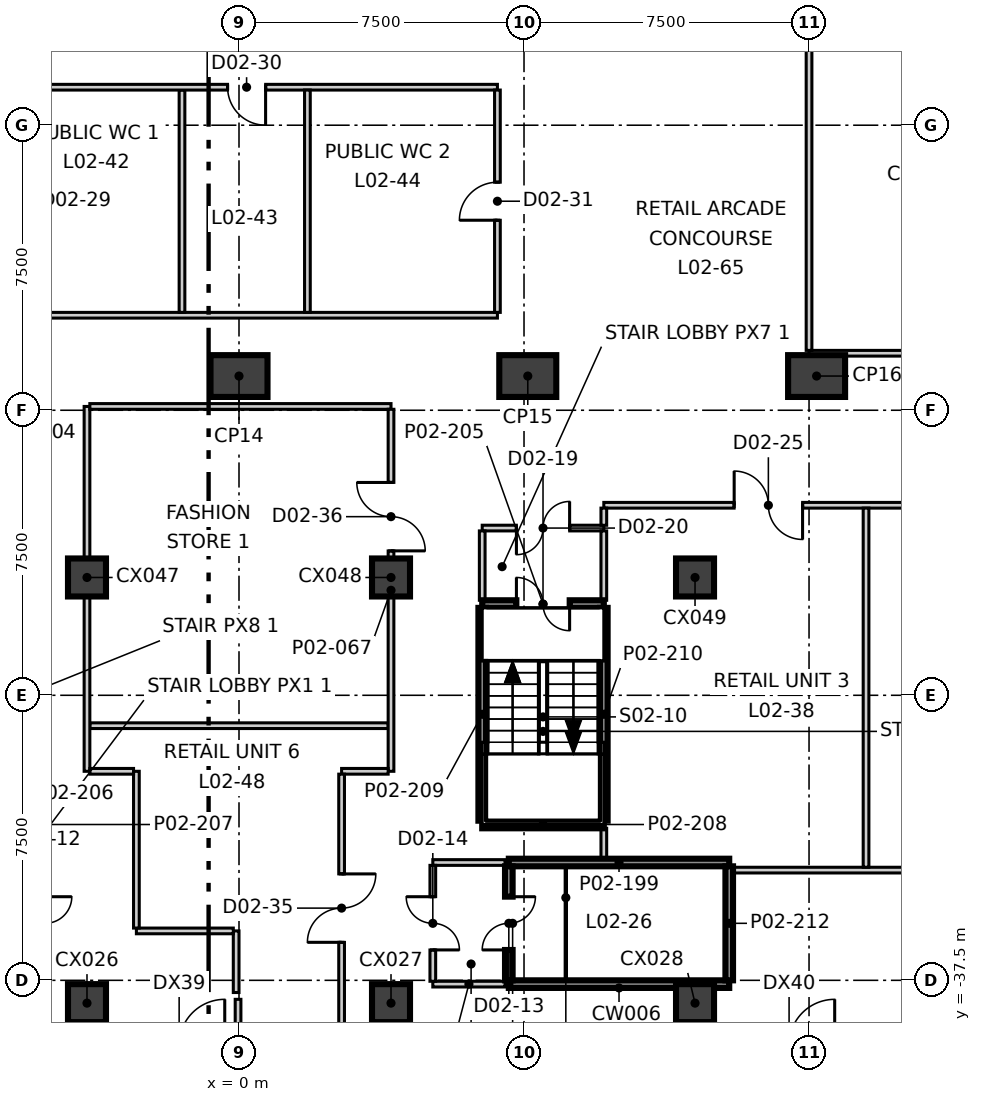
"""IFC4 building model, lengths in metres.
Left out: names, types, materials, properties, quantities, classifications, styles, units other than length and angle.
Written with IfcOpenShell. Run it as: python <this file> out.ifc"""

import sys

from ifc_helpers import new_model, si_unit, direction, frame, frame_2d, origin, origin_2d, place, context, subcontext, project, spatial, rectangle, extrude, element, fill, save


model = new_model("IFC4")
c1 = context("Model", 3, precision=1e-05, world=origin(), true_north=direction((0.0, 1.0)))
c2 = subcontext(c1, "Body", "Model", "MODEL_VIEW")
j1 = project(units=[si_unit("LENGTHUNIT", "METRE"), si_unit("PLANEANGLEUNIT", "RADIAN")], contexts=[c1])
p1 = place(None, origin())
s1 = spatial("IfcSite", under=j1, at=p1, CompositionType="ELEMENT")
p2 = place(p1, origin())
s2 = spatial("IfcBuilding", under=s1, at=p2, CompositionType="ELEMENT")
p3 = place(p2, frame((0.0, 0.0, 14.5)))
s3 = spatial("IfcBuildingStorey", under=s2, at=p3, CompositionType="ELEMENT", Elevation=14.5)
for number, where, z_axis, x_axis in (
    (1, (0.0, -21.6, -0.4), (0.0, 0.0, 1.0), (1.0, 0.0, 0.0)),
    (2, (7.599, -21.6, -0.4), (0.0, 0.0, 1.0), (1.0, 0.0, 0.0)),
    (3, (15.199, -21.6, -0.4), (0.0, 0.0, 1.0), (1.0, 0.0, 0.0)),
):
    element("IfcColumn", number, at=place(p3, frame(where, z_axis=z_axis, x_axis=x_axis)), inside=s3, PredefinedType="COLUMN", context=c2, shape_type="SweptSolid", body=[
        extrude(rectangle(XDim=1.5, YDim=1.1, at=origin_2d()), origin(), (0.0, 0.0, 1.0), 5.4),
    ])
for number, where, z_axis, x_axis in (
    (4, (-4.0, -38.1, -0.4), (0.0, 0.0, 1.0), (1.0, 0.0, 0.0)),
    (5, (4.0, -38.1, -0.4), (0.0, 0.0, 1.0), (1.0, 0.0, 0.0)),
    (6, (12.0, -38.1, -0.4), (0.0, 0.0, 1.0), (1.0, 0.0, 0.0)),
    (7, (-4.0, -26.9, -0.4), (0.0, 0.0, 1.0), (1.0, 0.0, 0.0)),
    (8, (4.0, -26.9, -0.4), (0.0, 0.0, 1.0), (1.0, 0.0, 0.0)),
    (9, (12.0, -26.9, -0.4), (0.0, 0.0, 1.0), (1.0, 0.0, 0.0)),
):
    element("IfcColumn", number, at=place(p3, frame(where, z_axis=z_axis, x_axis=x_axis)), inside=s3, PredefinedType="COLUMN", context=c2, shape_type="SweptSolid", body=[
        extrude(rectangle(XDim=1.0, YDim=1.0, at=origin_2d()), origin(), (0.0, 0.0, 1.0), 5.4),
    ])
p4 = place(p3, frame((6.4, -25.6, 0.0), z_axis=(0.0, 0.0, 1.0), x_axis=(1.0, 0.0, 0.0)))
e10 = element("IfcWall", 10, at=p4, inside=s3, PredefinedType="PARTITIONING", context=c2, shape_type="SweptSolid", body=[
    extrude(rectangle(XDim=3.2, YDim=0.15, at=frame_2d((1.6, 0.0))), origin(), (0.0, 0.0, 1.0), 5.0),
])
p5 = place(p4, frame((0.9, 0.0, 0.0)))
e11 = element("IfcOpeningElement", 11, at=p5, cuts=e10, PredefinedType="OPENING", context=c2, shape_type="SweptSolid", body=[
    extrude(rectangle(XDim=1.4, YDim=2.1, at=frame_2d((0.7, 1.05))), frame((0.0, 0.085, 0.0), z_axis=(0.0, -1.0, 0.0), x_axis=(1.0, 0.0, 0.0)), (0.0, 0.0, 1.0), 0.17),
])
for number, where, z_axis, x_axis in (
    (12, (5.1, -34.4, 0.0), (0.0, 0.0, 1.0), (1.0, 0.0, 0.0)),
    (13, (5.1, -37.6, 0.0), (0.0, 0.0, 1.0), (1.0, 0.0, 0.0)),
):
    element("IfcWall", number, at=place(p3, frame(where, z_axis=z_axis, x_axis=x_axis)), inside=s3, PredefinedType="PARTITIONING", context=c2, shape_type="SweptSolid", body=[
        extrude(rectangle(XDim=1.9, YDim=0.15, at=frame_2d((0.95, 0.0))), origin(), (0.0, 0.0, 1.0), 5.0),
    ])
for number, where, z_axis, x_axis in (
    (14, (6.4, -27.5, 0.0), (0.0, 0.0, 1.0), (0.0, 1.0, 0.0)),
    (15, (9.6, -27.5, 0.0), (0.0, 0.0, 1.0), (0.0, 1.0, 0.0)),
):
    element("IfcWall", number, at=place(p3, frame(where, z_axis=z_axis, x_axis=x_axis)), inside=s3, PredefinedType="PARTITIONING", context=c2, shape_type="SweptSolid", body=[
        extrude(rectangle(XDim=1.825, YDim=0.15, at=frame_2d((0.913, 0.0))), origin(), (0.0, 0.0, 1.0), 5.0),
    ])
p6 = place(p3, frame((5.1, -37.525, 0.0), z_axis=(0.0, 0.0, 1.0), x_axis=(0.0, 1.0, 0.0)))
e16 = element("IfcWall", 16, at=p6, inside=s3, PredefinedType="PARTITIONING", context=c2, shape_type="SweptSolid", body=[
    extrude(rectangle(XDim=3.05, YDim=0.15, at=frame_2d((1.525, 0.0))), origin(), (0.0, 0.0, 1.0), 5.0),
])
p7 = place(p6, frame((0.825, 0.0, 0.0)))
e17 = element("IfcOpeningElement", 17, at=p7, cuts=e16, PredefinedType="OPENING", context=c2, shape_type="SweptSolid", body=[
    extrude(rectangle(XDim=1.4, YDim=2.1, at=frame_2d((0.7, 1.05))), frame((0.0, 0.085, 0.0), z_axis=(0.0, -1.0, 0.0), x_axis=(1.0, 0.0, 0.0)), (0.0, 0.0, 1.0), 0.17),
])
p8 = place(p3, frame((13.0, -34.6, 0.0), z_axis=(0.0, 0.0, 1.0), x_axis=(1.0, 0.0, 0.0)))
e18 = element("IfcWall", 18, at=p8, inside=s3, PredefinedType="PARTITIONING", context=c2, shape_type="SweptSolid", body=[
    extrude(rectangle(XDim=14.3, YDim=0.15, at=frame_2d((7.15, 0.0))), origin(), (0.0, 0.0, 1.0), 5.0),
])
p9 = place(p3, frame((9.6, -25.0, 0.0), z_axis=(0.0, 0.0, 1.0), x_axis=(1.0, 0.0, 0.0)))
e19 = element("IfcWall", 19, at=p9, inside=s3, PredefinedType="PARTITIONING", context=c2, shape_type="SweptSolid", body=[
    extrude(rectangle(XDim=17.7, YDim=0.15, at=frame_2d((8.85, 0.0))), origin(), (0.0, 0.0, 1.0), 5.0),
])
p10 = place(p9, frame((3.43, 0.0, 0.0)))
e20 = element("IfcOpeningElement", 20, at=p10, cuts=e19, PredefinedType="OPENING", context=c2, shape_type="SweptSolid", body=[
    extrude(rectangle(XDim=1.8, YDim=2.1, at=frame_2d((0.9, 1.05))), frame((0.0, 0.085, 0.0), z_axis=(0.0, -1.0, 0.0), x_axis=(1.0, 0.0, 0.0)), (0.0, 0.0, 1.0), 0.17),
])
p11 = place(p9, frame((9.74, 0.0, 0.0)))
e21 = element("IfcOpeningElement", 21, at=p11, cuts=e19, PredefinedType="OPENING", context=c2, shape_type="SweptSolid", body=[
    extrude(rectangle(XDim=1.8, YDim=2.1, at=frame_2d((0.9, 1.05))), frame((0.0, 0.085, 0.0), z_axis=(0.0, -1.0, 0.0), x_axis=(1.0, 0.0, 0.0)), (0.0, 0.0, 1.0), 0.17),
])
p12 = place(p3, frame((-3.925, -30.8, 0.0), z_axis=(0.0, 0.0, 1.0), x_axis=(1.0, 0.0, 0.0)))
e22 = element("IfcWall", 22, at=p12, inside=s3, PredefinedType="PARTITIONING", context=c2, shape_type="SweptSolid", body=[
    extrude(rectangle(XDim=7.85, YDim=0.15, at=frame_2d((3.925, 0.0))), origin(), (0.0, 0.0, 1.0), 5.0),
])
p13 = place(p3, frame((-4.0, -32.0, 0.0), z_axis=(0.0, 0.0, 1.0), x_axis=(0.0, 1.0, 0.0)))
e23 = element("IfcWall", 23, at=p13, inside=s3, PredefinedType="PARTITIONING", context=c2, shape_type="SweptSolid", body=[
    extrude(rectangle(XDim=9.6, YDim=0.15, at=frame_2d((4.8, 0.0))), origin(), (0.0, 0.0, 1.0), 3.2),
])
p14 = place(p3, frame((-3.925, -22.4, 0.0), z_axis=(0.0, 0.0, 1.0), x_axis=(1.0, 0.0, 0.0)))
e24 = element("IfcWall", 24, at=p14, inside=s3, PredefinedType="PARTITIONING", context=c2, shape_type="SweptSolid", body=[
    extrude(rectangle(XDim=7.925, YDim=0.15, at=frame_2d((3.962, 0.0))), origin(), (0.0, 0.0, 1.0), 5.0),
])
p15 = place(p3, frame((4.0, -32.0, 0.0), z_axis=(0.0, 0.0, 1.0), x_axis=(0.0, 1.0, 0.0)))
e25 = element("IfcWall", 25, at=p15, inside=s3, PredefinedType="PARTITIONING", context=c2, shape_type="SweptSolid", body=[
    extrude(rectangle(XDim=9.525, YDim=0.15, at=frame_2d((4.762, 0.0))), origin(), (0.0, 0.0, 1.0), 3.2),
])
p16 = place(p15, frame((5.8, 0.0, 0.0)))
e26 = element("IfcOpeningElement", 26, at=p16, cuts=e25, PredefinedType="OPENING", context=c2, shape_type="SweptSolid", body=[
    extrude(rectangle(XDim=1.8, YDim=2.1, at=frame_2d((0.9, 1.05))), frame((0.0, 0.085, 0.0), z_axis=(0.0, -1.0, 0.0), x_axis=(1.0, 0.0, 0.0)), (0.0, 0.0, 1.0), 0.17),
])
p17 = place(p3, frame((-0.025, -39.2, 0.0), z_axis=(0.0, 0.0, 1.0), x_axis=(0.0, 1.0, 0.0)))
e27 = element("IfcWall", 27, at=p17, inside=s3, PredefinedType="PARTITIONING", context=c2, shape_type="SweptSolid", body=[
    extrude(rectangle(XDim=1.2, YDim=0.15, at=frame_2d((0.6, 0.0))), origin(), (0.0, 0.0, 1.0), 5.0),
])
p18 = place(p3, frame((-0.075, -37.821, 0.0), z_axis=(0.0, 0.0, 1.0), x_axis=(0.0, 1.0, 0.0)))
e28 = element("IfcWall", 28, at=p18, inside=s3, PredefinedType="PARTITIONING", context=c2, shape_type="SweptSolid", body=[
    extrude(rectangle(XDim=1.621, YDim=0.15, at=frame_2d((0.811, 0.0))), origin(), (0.0, 0.0, 1.0), 5.0),
])
p19 = place(p3, frame((-2.7, -36.2, 0.0), z_axis=(0.0, 0.0, 1.0), x_axis=(1.0, 0.0, 0.0)))
e29 = element("IfcWall", 29, at=p19, inside=s3, PredefinedType="PARTITIONING", context=c2, shape_type="SweptSolid", body=[
    extrude(rectangle(XDim=2.55, YDim=0.15, at=frame_2d((1.275, 0.0))), origin(), (0.0, 0.0, 1.0), 5.0),
])
p20 = place(p3, frame((-2.7, -36.125, 0.0), z_axis=(0.0, 0.0, 1.0), x_axis=(0.0, 1.0, 0.0)))
e30 = element("IfcWall", 30, at=p20, inside=s3, PredefinedType="PARTITIONING", context=c2, shape_type="SweptSolid", body=[
    extrude(rectangle(XDim=4.125, YDim=0.15, at=frame_2d((2.062, 0.0))), origin(), (0.0, 0.0, 1.0), 5.0),
])
p21 = place(p3, frame((-3.925, -32.0, 0.0), z_axis=(0.0, 0.0, 1.0), x_axis=(1.0, 0.0, 0.0)))
e31 = element("IfcWall", 31, at=p21, inside=s3, PredefinedType="PARTITIONING", context=c2, shape_type="SweptSolid", body=[
    extrude(rectangle(XDim=1.15, YDim=0.15, at=frame_2d((0.575, 0.0))), origin(), (0.0, 0.0, 1.0), 5.0),
])
p22 = place(p3, frame((2.7, -32.0, 0.0), z_axis=(0.0, 0.0, 1.0), x_axis=(1.0, 0.0, 0.0)))
e32 = element("IfcWall", 32, at=p22, inside=s3, PredefinedType="PARTITIONING", context=c2, shape_type="SweptSolid", body=[
    extrude(rectangle(XDim=1.225, YDim=0.15, at=frame_2d((0.613, 0.0))), origin(), (0.0, 0.0, 1.0), 5.0),
])
p23 = place(p3, frame((-6.5, -20.0, 0.0), z_axis=(0.0, 0.0, 1.0), x_axis=(1.0, 0.0, 0.0)))
e33 = element("IfcWall", 33, at=p23, inside=s3, PredefinedType="PARTITIONING", context=c2, shape_type="SweptSolid", body=[
    extrude(rectangle(XDim=13.3, YDim=0.15, at=frame_2d((6.65, 0.0))), origin(), (0.0, 0.0, 1.0), 5.0),
])
p24 = place(p3, frame((-1.5, -19.925, 0.0), z_axis=(0.0, 0.0, 1.0), x_axis=(0.0, 1.0, 0.0)))
e34 = element("IfcWall", 34, at=p24, inside=s3, PredefinedType="PARTITIONING", context=c2, shape_type="SweptSolid", body=[
    extrude(rectangle(XDim=5.85, YDim=0.15, at=frame_2d((2.925, 0.0))), origin(), (0.0, 0.0, 1.0), 5.0),
])
p25 = place(p3, frame((-6.425, -14.0, 0.0), z_axis=(0.0, 0.0, 1.0), x_axis=(1.0, 0.0, 0.0)))
e35 = element("IfcWall", 35, at=p25, inside=s3, PredefinedType="PARTITIONING", context=c2, shape_type="SweptSolid", body=[
    extrude(rectangle(XDim=13.225, YDim=0.15, at=frame_2d((6.613, 0.0))), origin(), (0.0, 0.0, 1.0), 5.0),
])
p26 = place(p25, frame((6.125, 0.0, 0.0)))
e36 = element("IfcOpeningElement", 36, at=p26, cuts=e35, PredefinedType="OPENING", context=c2, shape_type="SweptSolid", body=[
    extrude(rectangle(XDim=1.0, YDim=2.1, at=frame_2d((0.5, 1.05))), frame((0.0, 0.085, 0.0), z_axis=(0.0, -1.0, 0.0), x_axis=(1.0, 0.0, 0.0)), (0.0, 0.0, 1.0), 0.17),
])
p27 = place(p3, frame((6.8, -19.925, 0.0), z_axis=(0.0, 0.0, 1.0), x_axis=(0.0, 1.0, 0.0)))
e37 = element("IfcWall", 37, at=p27, inside=s3, PredefinedType="PARTITIONING", context=c2, shape_type="SweptSolid", body=[
    extrude(rectangle(XDim=5.85, YDim=0.15, at=frame_2d((2.925, 0.0))), origin(), (0.0, 0.0, 1.0), 5.0),
])
p28 = place(p27, frame((2.425, 0.0, 0.0)))
e38 = element("IfcOpeningElement", 38, at=p28, cuts=e37, PredefinedType="OPENING", context=c2, shape_type="SweptSolid", body=[
    extrude(rectangle(XDim=1.0, YDim=2.1, at=frame_2d((0.5, 1.05))), frame((0.0, 0.085, 0.0), z_axis=(0.0, -1.0, 0.0), x_axis=(1.0, 0.0, 0.0)), (0.0, 0.0, 1.0), 0.17),
])
p29 = place(p3, frame((1.8, -19.925, 0.0), z_axis=(0.0, 0.0, 1.0), x_axis=(0.0, 1.0, 0.0)))
e39 = element("IfcWall", 39, at=p29, inside=s3, PredefinedType="PARTITIONING", context=c2, shape_type="SweptSolid", body=[
    extrude(rectangle(XDim=5.85, YDim=0.15, at=frame_2d((2.925, 0.0))), origin(), (0.0, 0.0, 1.0), 5.0),
])
p30 = place(p3, frame((2.7, -39.2, 0.0), z_axis=(0.0, 0.0, 1.0), x_axis=(0.0, 1.0, 0.0)))
e40 = element("IfcWall", 40, at=p30, inside=s3, PredefinedType="PARTITIONING", context=c2, shape_type="SweptSolid", body=[
    extrude(rectangle(XDim=7.125, YDim=0.15, at=frame_2d((3.562, 0.0))), origin(), (0.0, 0.0, 1.0), 5.0),
])
p31 = place(p30, frame((2.7, 0.0, 0.0)))
e41 = element("IfcOpeningElement", 41, at=p31, cuts=e40, PredefinedType="OPENING", context=c2, shape_type="SweptSolid", body=[
    extrude(rectangle(XDim=1.8, YDim=2.1, at=frame_2d((0.9, 1.05))), frame((0.0, 0.085, 0.0), z_axis=(0.0, -1.0, 0.0), x_axis=(1.0, 0.0, 0.0)), (0.0, 0.0, 1.0), 0.17),
])
p32 = place(p3, frame((9.6, -34.3, 0.0), z_axis=(0.0, 0.0, 1.0), x_axis=(0.0, 1.0, 0.0)))
e42 = element("IfcWall", 42, at=p32, inside=s3, PredefinedType="PARTITIONING", context=c2, shape_type="SweptSolid", body=[
    extrude(rectangle(XDim=0.802, YDim=0.15, at=frame_2d((0.401, 0.0))), origin(), (0.0, 0.0, 1.0), 5.0),
])
p33 = place(p3, frame((9.6, -25.527, 0.0), z_axis=(0.0, 0.0, 1.0), x_axis=(0.0, 1.0, 0.0)))
e43 = element("IfcWall", 43, at=p33, inside=s3, PredefinedType="PARTITIONING", context=c2, shape_type="SweptSolid", body=[
    extrude(rectangle(XDim=0.452, YDim=0.15, at=frame_2d((0.226, 0.0))), origin(), (0.0, 0.0, 1.0), 5.0),
])
p34 = place(p3, frame((16.5, -34.525, 0.0), z_axis=(0.0, 0.0, 1.0), x_axis=(0.0, 1.0, 0.0)))
e44 = element("IfcWall", 44, at=p34, inside=s3, PredefinedType="PARTITIONING", context=c2, shape_type="SweptSolid", body=[
    extrude(rectangle(XDim=9.45, YDim=0.15, at=frame_2d((4.725, 0.0))), origin(), (0.0, 0.0, 1.0), 5.0),
])
p35 = place(p3, frame((15.0, -21.0, 0.0), z_axis=(0.0, 0.0, 1.0), x_axis=(1.0, 0.0, 0.0)))
e45 = element("IfcWall", 45, at=p35, inside=s3, PredefinedType="PARTITIONING", context=c2, shape_type="SweptSolid", body=[
    extrude(rectangle(XDim=10.663, YDim=0.15, at=frame_2d((5.332, 0.0))), origin(), (0.0, 0.0, 1.0), 5.0),
])
p36 = place(p3, frame((15.0, -20.925, 0.0), z_axis=(0.0, 0.0, 1.0), x_axis=(0.0, 1.0, 0.0)))
e46 = element("IfcWall", 46, at=p36, inside=s3, PredefinedType="PARTITIONING", context=c2, shape_type="SweptSolid", body=[
    extrude(rectangle(XDim=9.85, YDim=0.15, at=frame_2d((4.925, 0.0))), origin(), (0.0, 0.0, 1.0), 5.0),
])
for number, where, z_axis, x_axis in (
    (47, (7.1, -34.4, 0.0), (0.0, 0.0, 1.0), (1.0, 0.0, 0.0)),
    (48, (7.1, -37.6, 0.0), (0.0, 0.0, 1.0), (1.0, 0.0, 0.0)),
):
    element("IfcWall", number, at=place(p3, frame(where, z_axis=z_axis, x_axis=x_axis)), inside=s3, PredefinedType="SOLIDWALL", context=c2, shape_type="SweptSolid", body=[
        extrude(rectangle(XDim=5.8, YDim=0.2, at=frame_2d((2.9, 0.0))), origin(), (0.0, 0.0, 1.0), 5.0),
    ])
p37 = place(p3, frame((6.4, -27.6, 0.0), z_axis=(0.0, 0.0, 1.0), x_axis=(1.0, 0.0, 0.0)))
e49 = element("IfcWall", 49, at=p37, inside=s3, PredefinedType="SOLIDWALL", context=c2, shape_type="SweptSolid", body=[
    extrude(rectangle(XDim=3.2, YDim=0.2, at=frame_2d((1.6, 0.0))), origin(), (0.0, 0.0, 1.0), 5.0),
])
p38 = place(p37, frame((0.9, 0.0, 0.0)))
e50 = element("IfcOpeningElement", 50, at=p38, cuts=e49, PredefinedType="OPENING", context=c2, shape_type="SweptSolid", body=[
    extrude(rectangle(XDim=1.4, YDim=2.1, at=frame_2d((0.7, 1.05))), frame((0.0, 0.11, 0.0), z_axis=(0.0, -1.0, 0.0), x_axis=(1.0, 0.0, 0.0)), (0.0, 0.0, 1.0), 0.22),
])
p39 = place(p3, frame((6.4, -33.4, 0.0), z_axis=(0.0, 0.0, 1.0), x_axis=(1.0, 0.0, 0.0)))
e51 = element("IfcWall", 51, at=p39, inside=s3, PredefinedType="SOLIDWALL", context=c2, shape_type="SweptSolid", body=[
    extrude(rectangle(XDim=3.2, YDim=0.2, at=frame_2d((1.6, 0.0))), origin(), (0.0, 0.0, 1.0), 5.0),
])
for number, where, z_axis, x_axis in (
    (52, (6.4, -33.3, 0.0), (0.0, 0.0, 1.0), (0.0, 1.0, 0.0)),
    (53, (9.6, -33.3, 0.0), (0.0, 0.0, 1.0), (0.0, 1.0, 0.0)),
):
    element("IfcWall", number, at=place(p3, frame(where, z_axis=z_axis, x_axis=x_axis)), inside=s3, PredefinedType="SOLIDWALL", context=c2, shape_type="SweptSolid", body=[
        extrude(rectangle(XDim=5.6, YDim=0.2, at=frame_2d((2.8, 0.0))), origin(), (0.0, 0.0, 1.0), 5.0),
    ])
p40 = place(p3, frame((7.1, -37.5, 0.0), z_axis=(0.0, 0.0, 1.0), x_axis=(0.0, 1.0, 0.0)))
e54 = element("IfcWall", 54, at=p40, inside=s3, PredefinedType="SOLIDWALL", context=c2, shape_type="SweptSolid", body=[
    extrude(rectangle(XDim=3.0, YDim=0.2, at=frame_2d((1.5, 0.0))), origin(), (0.0, 0.0, 1.0), 5.0),
])
p41 = place(p40, frame((0.8, 0.0, 0.0)))
e55 = element("IfcOpeningElement", 55, at=p41, cuts=e54, PredefinedType="OPENING", context=c2, shape_type="SweptSolid", body=[
    extrude(rectangle(XDim=1.4, YDim=2.1, at=frame_2d((0.7, 1.05))), frame((0.0, 0.11, 0.0), z_axis=(0.0, -1.0, 0.0), x_axis=(1.0, 0.0, 0.0)), (0.0, 0.0, 1.0), 0.22),
])
p42 = place(p3, frame((12.9, -37.5, 0.0), z_axis=(0.0, 0.0, 1.0), x_axis=(0.0, 1.0, 0.0)))
e56 = element("IfcWall", 56, at=p42, inside=s3, PredefinedType="SOLIDWALL", context=c2, shape_type="SweptSolid", body=[
    extrude(rectangle(XDim=3.0, YDim=0.2, at=frame_2d((1.5, 0.0))), origin(), (0.0, 0.0, 1.0), 5.0),
])
p43 = place(p41, origin())
e57 = element("IfcDoor", 57, at=p43, inside=s3, OperationType="DOUBLE_DOOR_SINGLE_SWING", PredefinedType="DOOR", context=c2, shape_type="SweptSolid", body=[
    extrude(rectangle(XDim=1.4, YDim=2.1, at=frame_2d((0.7, 1.05))), frame((0.0, 0.025, 0.0), z_axis=(0.0, -1.0, 0.0), x_axis=(1.0, 0.0, 0.0)), (0.0, 0.0, 1.0), 0.05),
])
fill(e55, e57)
p44 = place(p7, origin())
e58 = element("IfcDoor", 58, at=p44, inside=s3, OperationType="DOUBLE_DOOR_SINGLE_SWING", PredefinedType="DOOR", context=c2, shape_type="SweptSolid", body=[
    extrude(rectangle(XDim=1.4, YDim=2.1, at=frame_2d((0.7, 1.05))), frame((0.0, 0.025, 0.0), z_axis=(0.0, -1.0, 0.0), x_axis=(1.0, 0.0, 0.0)), (0.0, 0.0, 1.0), 0.05),
])
fill(e17, e58)
p45 = place(p38, origin())
e59 = element("IfcDoor", 59, at=p45, inside=s3, OperationType="DOUBLE_DOOR_SINGLE_SWING", PredefinedType="DOOR", context=c2, shape_type="SweptSolid", body=[
    extrude(rectangle(XDim=1.4, YDim=2.1, at=frame_2d((0.7, 1.05))), frame((0.0, 0.025, 0.0), z_axis=(0.0, -1.0, 0.0), x_axis=(1.0, 0.0, 0.0)), (0.0, 0.0, 1.0), 0.05),
])
fill(e50, e59)
p46 = place(p5, origin())
e60 = element("IfcDoor", 60, at=p46, inside=s3, OperationType="DOUBLE_DOOR_SINGLE_SWING", PredefinedType="DOOR", context=c2, shape_type="SweptSolid", body=[
    extrude(rectangle(XDim=1.4, YDim=2.1, at=frame_2d((0.7, 1.05))), frame((0.0, 0.025, 0.0), z_axis=(0.0, -1.0, 0.0), x_axis=(1.0, 0.0, 0.0)), (0.0, 0.0, 1.0), 0.05),
])
fill(e11, e60)
p47 = place(p10, origin())
e61 = element("IfcDoor", 61, at=p47, inside=s3, OperationType="DOUBLE_DOOR_SINGLE_SWING", PredefinedType="DOOR", context=c2, shape_type="SweptSolid", body=[
    extrude(rectangle(XDim=1.8, YDim=2.1, at=frame_2d((0.9, 1.05))), frame((0.0, 0.025, 0.0), z_axis=(0.0, -1.0, 0.0), x_axis=(1.0, 0.0, 0.0)), (0.0, 0.0, 1.0), 0.05),
])
fill(e20, e61)
p48 = place(p26, origin())
e62 = element("IfcDoor", 62, at=p48, inside=s3, OperationType="SINGLE_SWING_RIGHT", PredefinedType="DOOR", context=c2, shape_type="SweptSolid", body=[
    extrude(rectangle(XDim=1.0, YDim=2.1, at=frame_2d((0.5, 1.05))), frame((0.0, 0.025, 0.0), z_axis=(0.0, -1.0, 0.0), x_axis=(1.0, 0.0, 0.0)), (0.0, 0.0, 1.0), 0.05),
])
fill(e36, e62)
p49 = place(p28, origin())
e63 = element("IfcDoor", 63, at=p49, inside=s3, OperationType="SINGLE_SWING_RIGHT", PredefinedType="DOOR", context=c2, shape_type="SweptSolid", body=[
    extrude(rectangle(XDim=1.0, YDim=2.1, at=frame_2d((0.5, 1.05))), frame((0.0, 0.025, 0.0), z_axis=(0.0, -1.0, 0.0), x_axis=(1.0, 0.0, 0.0)), (0.0, 0.0, 1.0), 0.05),
])
fill(e38, e63)
p50 = place(p31, origin())
e64 = element("IfcDoor", 64, at=p50, inside=s3, OperationType="DOUBLE_DOOR_SINGLE_SWING", PredefinedType="DOOR", context=c2, shape_type="SweptSolid", body=[
    extrude(rectangle(XDim=1.8, YDim=2.1, at=frame_2d((0.9, 1.05))), frame((0.0, 0.025, 0.0), z_axis=(0.0, -1.0, 0.0), x_axis=(1.0, 0.0, 0.0)), (0.0, 0.0, 1.0), 0.05),
])
fill(e41, e64)
p51 = place(p16, origin())
e65 = element("IfcDoor", 65, at=p51, inside=s3, OperationType="DOUBLE_DOOR_SINGLE_SWING", PredefinedType="DOOR", context=c2, shape_type="SweptSolid", body=[
    extrude(rectangle(XDim=1.8, YDim=2.1, at=frame_2d((0.9, 1.05))), frame((0.0, 0.025, 0.0), z_axis=(0.0, -1.0, 0.0), x_axis=(1.0, 0.0, 0.0)), (0.0, 0.0, 1.0), 0.05),
])
fill(e26, e65)
save(model, sys.argv[1])
